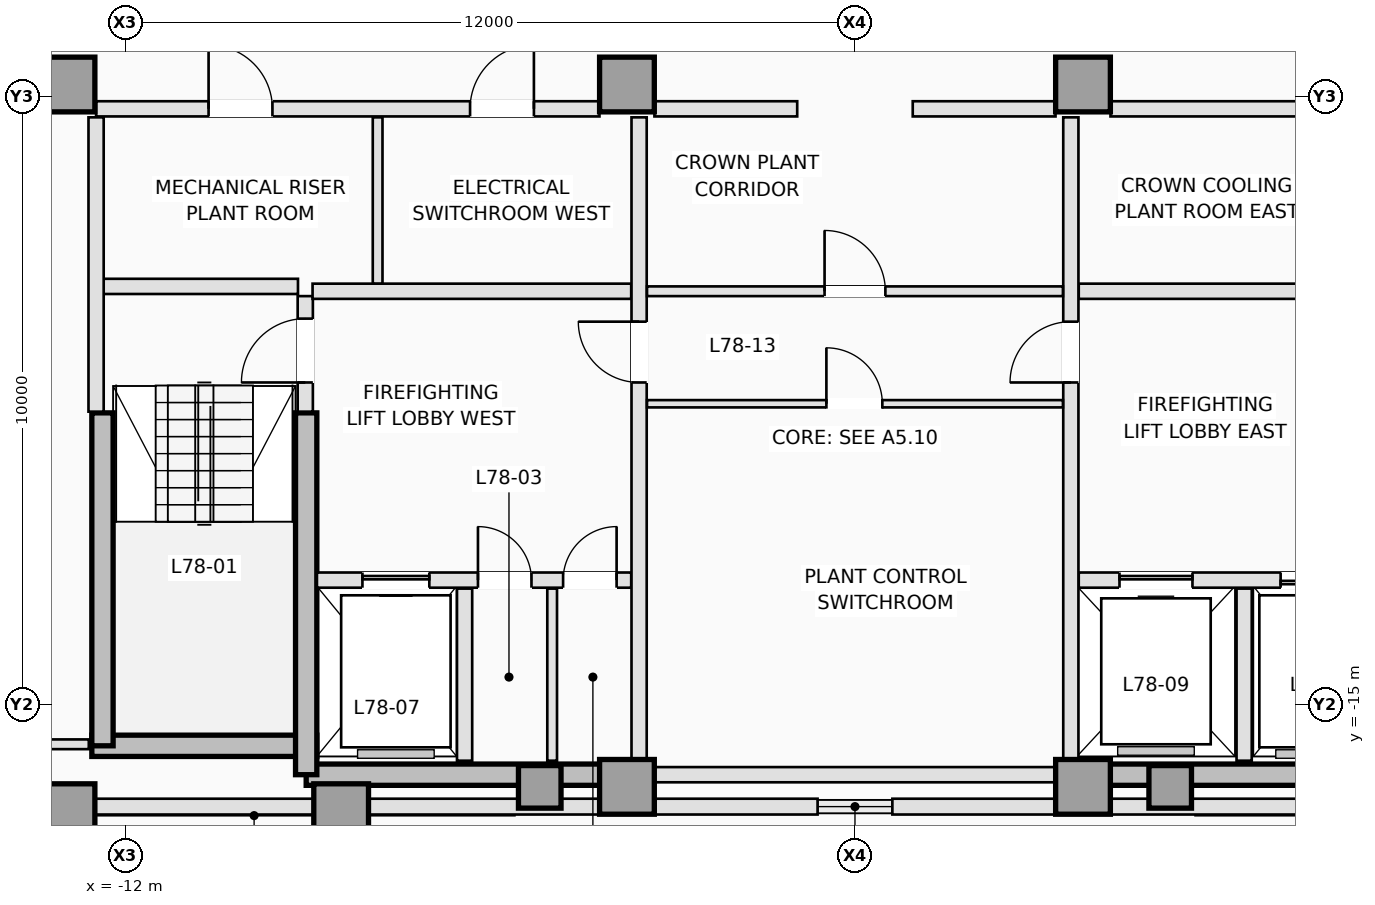
"""IFC4 building model, lengths in metres.
Left out: names, types, materials, properties, quantities, classifications, styles, units other than length and angle.
Written with IfcOpenShell. Run it as: python <this file> out.ifc"""

import sys

from ifc_helpers import new_model, si_unit, direction, frame, frame_2d, origin, origin_2d, place, context, subcontext, project, spatial, rectangle, extrude, element, fill, save


model = new_model("IFC4")
c1 = context("Model", 3, precision=1e-05, world=origin(), true_north=direction((0.0, 1.0)))
c2 = subcontext(c1, "Body", "Model", "MODEL_VIEW")
j1 = project(units=[si_unit("LENGTHUNIT", "METRE"), si_unit("PLANEANGLEUNIT", "RADIAN")], contexts=[c1])
p1 = place(None, origin())
s1 = spatial("IfcSite", under=j1, at=p1, CompositionType="ELEMENT")
p2 = place(p1, origin())
s2 = spatial("IfcBuilding", under=s1, at=p2, CompositionType="ELEMENT")
p3 = place(p2, frame((0.0, 0.0, 280.5)))
s3 = spatial("IfcBuildingStorey", under=s2, at=p3, CompositionType="ELEMENT", Elevation=280.5)
p4 = place(p3, frame((-12.55, -15.675, 0.0), z_axis=(0.0, 0.0, 1.0), x_axis=(1.0, 0.0, 0.0)))
e1 = element("IfcWall", 1, at=p4, inside=s3, PredefinedType="SHEAR", context=c2, shape_type="SweptSolid", body=[
    extrude(rectangle(XDim=3.7, YDim=0.35, at=frame_2d((1.85, 0.0))), origin(), (0.0, 0.0, 1.0), 3.2),
])
for number, where, z_axis, x_axis in (
    (2, (-9.025, -16.15, 0.0), (0.0, 0.0, 1.0), (1.0, 0.0, 0.0)),
    (3, (3.75, -16.15, 0.0), (0.0, 0.0, 1.0), (1.0, 0.0, 0.0)),
):
    element("IfcWall", number, at=place(p3, frame(where, z_axis=z_axis, x_axis=x_axis)), inside=s3, PredefinedType="SHEAR", context=c2, shape_type="SweptSolid", body=[
        extrude(rectangle(XDim=5.275, YDim=0.35, at=frame_2d((2.637, 0.0))), origin(), (0.0, 0.0, 1.0), 3.2),
    ])
p5 = place(p3, frame((-12.375, -15.675, 0.0), z_axis=(0.0, 0.0, 1.0), x_axis=(0.0, 1.0, 0.0)))
e4 = element("IfcWall", 4, at=p5, inside=s3, PredefinedType="SHEAR", context=c2, shape_type="SweptSolid", body=[
    extrude(rectangle(XDim=5.475, YDim=0.35, at=frame_2d((2.738, 0.0))), origin(), (0.0, 0.0, 1.0), 3.2),
])
p6 = place(p3, frame((-9.025, -16.15, 0.0), z_axis=(0.0, 0.0, 1.0), x_axis=(0.0, 1.0, 0.0)))
e5 = element("IfcWall", 5, at=p6, inside=s3, PredefinedType="SHEAR", context=c2, shape_type="SweptSolid", body=[
    extrude(rectangle(XDim=5.95, YDim=0.35, at=frame_2d((2.975, 0.0))), origin(), (0.0, 0.0, 1.0), 3.2),
])
for number, where, z_axis, x_axis in (
    (6, (-12.95, -16.75, 0.0), (0.0, 0.0, 1.0), (1.0, 0.0, 0.0)),
    (7, (-8.45, -16.75, 0.0), (0.0, 0.0, 1.0), (1.0, 0.0, 0.0)),
    (8, (-3.75, -16.35, 0.0), (0.0, 0.0, 1.0), (1.0, 0.0, 0.0)),
    (9, (3.75, -16.35, 0.0), (0.0, 0.0, 1.0), (1.0, 0.0, 0.0)),
    (10, (-12.95, -4.8, 0.0), (0.0, 0.0, 1.0), (1.0, 0.0, 0.0)),
    (11, (-3.75, -4.8, 0.0), (0.0, 0.0, 1.0), (1.0, 0.0, 0.0)),
    (12, (3.75, -4.8, 0.0), (0.0, 0.0, 1.0), (1.0, 0.0, 0.0)),
):
    element("IfcColumn", number, at=place(p3, frame(where, z_axis=z_axis, x_axis=x_axis)), inside=s3, PredefinedType="COLUMN", context=c2, shape_type="SweptSolid", body=[
        extrude(rectangle(XDim=0.9, YDim=0.9, at=origin_2d()), origin(), (0.0, 0.0, 1.0), 3.2),
    ])
for number, where, z_axis, x_axis in (
    (13, (-5.184, -16.35, 0.0), (0.0, 0.0, 1.0), (0.0, 1.0, 0.0)),
    (14, (5.184, -16.35, 0.0), (0.0, 0.0, 1.0), (0.0, 1.0, 0.0)),
):
    element("IfcColumn", number, at=place(p3, frame(where, z_axis=z_axis, x_axis=x_axis)), inside=s3, PredefinedType="COLUMN", context=c2, shape_type="SweptSolid", body=[
        extrude(rectangle(XDim=0.7, YDim=0.7, at=origin_2d()), origin(), (0.0, 0.0, 1.0), 3.2),
    ])
for number, where, z_axis, x_axis in (
    (15, (15.542, -16.675, 0.0), (0.0, 0.0, 1.0), (-1.0, 0.0, 0.0)),
    (16, (-4.22, -16.675, 0.0), (0.0, 0.0, 1.0), (-1.0, 0.0, 0.0)),
):
    element("IfcWall", number, at=place(p3, frame(where, z_axis=z_axis, x_axis=x_axis)), inside=s3, PredefinedType="STANDARD", context=c2, shape_type="SweptSolid", body=[
        extrude(rectangle(XDim=11.323, YDim=0.26, at=frame_2d((5.661, 0.0))), origin(), (0.0, 0.0, 1.0), 2.234),
    ])
for number, where, z_axis, x_axis in (
    (17, (3.28, -16.675, 0.0), (0.0, 0.0, 1.0), (-1.0, 0.0, 0.0)),
    (18, (-0.615, -16.675, 0.0), (0.0, 0.0, 1.0), (-1.0, 0.0, 0.0)),
):
    element("IfcWall", number, at=place(p3, frame(where, z_axis=z_axis, x_axis=x_axis)), inside=s3, PredefinedType="STANDARD", context=c2, shape_type="SweptSolid", body=[
        extrude(rectangle(XDim=2.665, YDim=0.26, at=frame_2d((1.333, 0.0))), origin(), (0.0, 0.0, 1.0), 2.95),
    ])
p7 = place(p3, frame((-18.292, -11.781, 0.0), z_axis=(0.0, 0.0, 1.0), x_axis=(0.490270316201, 0.871570431492, 0.0)))
e19 = element("IfcWall", 19, at=p7, inside=s3, PredefinedType="STANDARD", context=c2, shape_type="SweptSolid", body=[
    extrude(rectangle(XDim=10.216, YDim=0.26, at=frame_2d((5.108, 0.0))), origin(), (0.0, 0.0, 1.0), 2.95),
])
p8 = place(p3, frame((-9.04, -10.18, 0.0), z_axis=(0.0, 0.0, 1.0), x_axis=(0.0, 1.0, 0.0)))
e20 = element("IfcWall", 20, at=p8, inside=s3, PredefinedType="PARTITIONING", context=c2, shape_type="SweptSolid", body=[
    extrude(rectangle(XDim=1.9, YDim=0.25, at=frame_2d((0.95, 0.0))), origin(), (0.0, 0.0, 1.0), 2.95),
])
p9 = place(p8, frame((0.48, 0.0, 0.0)))
e21 = element("IfcOpeningElement", 21, at=p9, cuts=e20, PredefinedType="OPENING", context=c2, shape_type="SweptSolid", body=[
    extrude(rectangle(XDim=1.05, YDim=2.15, at=frame_2d((0.525, 1.075))), frame((0.0, 0.135, 0.0), z_axis=(0.0, -1.0, 0.0), x_axis=(1.0, 0.0, 0.0)), (0.0, 0.0, 1.0), 0.27),
])
p10 = place(p3, frame((-12.38, -8.12, 0.0), z_axis=(0.0, 0.0, 1.0), x_axis=(1.0, 0.0, 0.0)))
e22 = element("IfcWall", 22, at=p10, inside=s3, PredefinedType="PARTITIONING", context=c2, shape_type="SweptSolid", body=[
    extrude(rectangle(XDim=3.22, YDim=0.25, at=frame_2d((1.61, 0.0))), origin(), (0.0, 0.0, 1.0), 2.95),
])
p11 = place(p3, frame((-12.48, -10.18, 0.0), z_axis=(0.0, 0.0, 1.0), x_axis=(0.0, 1.0, 0.0)))
e23 = element("IfcWall", 23, at=p11, inside=s3, PredefinedType="PARTITIONING", context=c2, shape_type="SweptSolid", body=[
    extrude(rectangle(XDim=4.84, YDim=0.25, at=frame_2d((2.42, 0.0))), origin(), (0.0, 0.0, 1.0), 2.95),
])
p12 = place(p3, frame((-8.848, -12.95, 0.0), z_axis=(0.0, 0.0, 1.0), x_axis=(1.0, 0.0, 0.0)))
e24 = element("IfcWall", 24, at=p12, inside=s3, PredefinedType="PARTITIONING", context=c2, shape_type="SweptSolid", body=[
    extrude(rectangle(XDim=5.168, YDim=0.25, at=frame_2d((2.584, 0.0))), origin(), (0.0, 0.0, 1.0), 2.95),
])
p13 = place(p12, frame((0.748, 0.0, 0.0)))
e25 = element("IfcOpeningElement", 25, at=p13, cuts=e24, PredefinedType="OPENING", context=c2, shape_type="SweptSolid", body=[
    extrude(rectangle(XDim=1.1, YDim=2.15, at=frame_2d((0.55, 1.075))), frame((0.0, 0.135, 0.0), z_axis=(0.0, -1.0, 0.0), x_axis=(1.0, 0.0, 0.0)), (0.0, 0.0, 1.0), 0.27),
])
p14 = place(p12, frame((2.648, 0.0, 0.0)))
e26 = element("IfcOpeningElement", 26, at=p14, cuts=e24, PredefinedType="OPENING", context=c2, shape_type="SweptSolid", body=[
    extrude(rectangle(XDim=0.88, YDim=2.1, at=frame_2d((0.44, 1.05))), frame((0.0, 0.135, 0.0), z_axis=(0.0, -1.0, 0.0), x_axis=(1.0, 0.0, 0.0)), (0.0, 0.0, 1.0), 0.27),
])
p15 = place(p12, frame((4.048, 0.0, 0.0)))
e27 = element("IfcOpeningElement", 27, at=p15, cuts=e24, PredefinedType="OPENING", context=c2, shape_type="SweptSolid", body=[
    extrude(rectangle(XDim=0.88, YDim=2.1, at=frame_2d((0.44, 1.05))), frame((0.0, 0.135, 0.0), z_axis=(0.0, -1.0, 0.0), x_axis=(1.0, 0.0, 0.0)), (0.0, 0.0, 1.0), 0.27),
])
p16 = place(p3, frame((3.68, -12.95, 0.0), z_axis=(0.0, 0.0, 1.0), x_axis=(1.0, 0.0, 0.0)))
e28 = element("IfcWall", 28, at=p16, inside=s3, PredefinedType="PARTITIONING", context=c2, shape_type="SweptSolid", body=[
    extrude(rectangle(XDim=5.168, YDim=0.25, at=frame_2d((2.584, 0.0))), origin(), (0.0, 0.0, 1.0), 2.95),
])
p17 = place(p16, frame((3.32, 0.0, 0.0)))
e29 = element("IfcOpeningElement", 29, at=p17, cuts=e28, PredefinedType="OPENING", context=c2, shape_type="SweptSolid", body=[
    extrude(rectangle(XDim=1.1, YDim=2.15, at=frame_2d((0.55, 1.075))), frame((0.0, 0.135, 0.0), z_axis=(0.0, -1.0, 0.0), x_axis=(1.0, 0.0, 0.0)), (0.0, 0.0, 1.0), 0.27),
])
p18 = place(p16, frame((0.67, 0.0, 0.0)))
e30 = element("IfcOpeningElement", 30, at=p18, cuts=e28, PredefinedType="OPENING", context=c2, shape_type="SweptSolid", body=[
    extrude(rectangle(XDim=1.2, YDim=2.15, at=frame_2d((0.6, 1.075))), frame((0.0, 0.135, 0.0), z_axis=(0.0, -1.0, 0.0), x_axis=(1.0, 0.0, 0.0)), (0.0, 0.0, 1.0), 0.27),
])
p19 = place(p3, frame((-6.42, -15.92, 0.0), z_axis=(0.0, 0.0, 1.0), x_axis=(0.0, 1.0, 0.0)))
e31 = element("IfcWall", 31, at=p19, inside=s3, PredefinedType="PARTITIONING", context=c2, shape_type="SweptSolid", body=[
    extrude(rectangle(XDim=2.83, YDim=0.25, at=frame_2d((1.415, 0.0))), origin(), (0.0, 0.0, 1.0), 2.95),
])
p20 = place(p3, frame((-4.98, -15.92, 0.0), z_axis=(0.0, 0.0, 1.0), x_axis=(0.0, 1.0, 0.0)))
e32 = element("IfcWall", 32, at=p20, inside=s3, PredefinedType="PARTITIONING", context=c2, shape_type="SweptSolid", body=[
    extrude(rectangle(XDim=2.83, YDim=0.16, at=frame_2d((1.415, 0.0))), origin(), (0.0, 0.0, 1.0), 2.95),
])
p21 = place(p3, frame((6.4, -15.92, 0.0), z_axis=(0.0, 0.0, 1.0), x_axis=(0.0, 1.0, 0.0)))
e33 = element("IfcWall", 33, at=p21, inside=s3, PredefinedType="PARTITIONING", context=c2, shape_type="SweptSolid", body=[
    extrude(rectangle(XDim=2.83, YDim=0.25, at=frame_2d((1.415, 0.0))), origin(), (0.0, 0.0, 1.0), 2.95),
])
for number, where, z_axis, x_axis in (
    (34, (-8.92, -8.2, 0.0), (0.0, 0.0, 1.0), (1.0, 0.0, 0.0)),
    (35, (3.68, -8.2, 0.0), (0.0, 0.0, 1.0), (1.0, 0.0, 0.0)),
):
    element("IfcWall", number, at=place(p3, frame(where, z_axis=z_axis, x_axis=x_axis)), inside=s3, PredefinedType="PARTITIONING", context=c2, shape_type="SweptSolid", body=[
        extrude(rectangle(XDim=5.24, YDim=0.25, at=frame_2d((2.62, 0.0))), origin(), (0.0, 0.0, 1.0), 2.95),
    ])
p22 = place(p3, frame((-3.55, -15.898, 0.0), z_axis=(0.0, 0.0, 1.0), x_axis=(0.0, 1.0, 0.0)))
e36 = element("IfcWall", 36, at=p22, inside=s3, PredefinedType="PARTITIONING", context=c2, shape_type="SweptSolid", body=[
    extrude(rectangle(XDim=10.558, YDim=0.25, at=frame_2d((5.279, 0.0))), origin(), (0.0, 0.0, 1.0), 2.95),
])
p23 = place(p22, frame((6.198, 0.0, 0.0)))
e37 = element("IfcOpeningElement", 37, at=p23, cuts=e36, PredefinedType="OPENING", context=c2, shape_type="SweptSolid", body=[
    extrude(rectangle(XDim=1.0, YDim=2.15, at=frame_2d((0.5, 1.075))), frame((0.0, 0.135, 0.0), z_axis=(0.0, -1.0, 0.0), x_axis=(1.0, 0.0, 0.0)), (0.0, 0.0, 1.0), 0.27),
])
p24 = place(p3, frame((3.55, -15.898, 0.0), z_axis=(0.0, 0.0, 1.0), x_axis=(0.0, 1.0, 0.0)))
e38 = element("IfcWall", 38, at=p24, inside=s3, PredefinedType="PARTITIONING", context=c2, shape_type="SweptSolid", body=[
    extrude(rectangle(XDim=10.558, YDim=0.25, at=frame_2d((5.279, 0.0))), origin(), (0.0, 0.0, 1.0), 2.95),
])
p25 = place(p24, frame((6.198, 0.0, 0.0)))
e39 = element("IfcOpeningElement", 39, at=p25, cuts=e38, PredefinedType="OPENING", context=c2, shape_type="SweptSolid", body=[
    extrude(rectangle(XDim=1.0, YDim=2.15, at=frame_2d((0.5, 1.075))), frame((0.0, 0.135, 0.0), z_axis=(0.0, -1.0, 0.0), x_axis=(1.0, 0.0, 0.0)), (0.0, 0.0, 1.0), 0.27),
])
p26 = place(p3, frame((-12.48, -5.2, 0.0), z_axis=(0.0, 0.0, 1.0), x_axis=(1.0, 0.0, 0.0)))
e40 = element("IfcWall", 40, at=p26, inside=s3, PredefinedType="PARTITIONING", context=c2, shape_type="SweptSolid", body=[
    extrude(rectangle(XDim=8.278, YDim=0.25, at=frame_2d((4.139, 0.0))), origin(), (0.0, 0.0, 1.0), 2.95),
])
p27 = place(p26, frame((1.85, 0.0, 0.0)))
e41 = element("IfcOpeningElement", 41, at=p27, cuts=e40, PredefinedType="OPENING", context=c2, shape_type="SweptSolid", body=[
    extrude(rectangle(XDim=1.05, YDim=2.12, at=frame_2d((0.525, 1.06))), frame((0.0, 0.135, 0.0), z_axis=(0.0, -1.0, 0.0), x_axis=(1.0, 0.0, 0.0)), (0.0, 0.0, 1.0), 0.27),
])
p28 = place(p26, frame((6.15, 0.0, 0.0)))
e42 = element("IfcOpeningElement", 42, at=p28, cuts=e40, PredefinedType="OPENING", context=c2, shape_type="SweptSolid", body=[
    extrude(rectangle(XDim=1.05, YDim=2.12, at=frame_2d((0.525, 1.06))), frame((0.0, 0.135, 0.0), z_axis=(0.0, -1.0, 0.0), x_axis=(1.0, 0.0, 0.0)), (0.0, 0.0, 1.0), 0.27),
])
p29 = place(p3, frame((4.202, -5.2, 0.0), z_axis=(0.0, 0.0, 1.0), x_axis=(1.0, 0.0, 0.0)))
e43 = element("IfcWall", 43, at=p29, inside=s3, PredefinedType="PARTITIONING", context=c2, shape_type="SweptSolid", body=[
    extrude(rectangle(XDim=8.278, YDim=0.25, at=frame_2d((4.139, 0.0))), origin(), (0.0, 0.0, 1.0), 2.95),
])
p30 = place(p29, frame((3.148, 0.0, 0.0)))
e44 = element("IfcOpeningElement", 44, at=p30, cuts=e43, PredefinedType="OPENING", context=c2, shape_type="SweptSolid", body=[
    extrude(rectangle(XDim=1.05, YDim=2.12, at=frame_2d((0.525, 1.06))), frame((0.0, 0.135, 0.0), z_axis=(0.0, -1.0, 0.0), x_axis=(1.0, 0.0, 0.0)), (0.0, 0.0, 1.0), 0.27),
])
for number, where, z_axis, x_axis in (
    (45, (-3.298, -5.2, 0.0), (0.0, 0.0, 1.0), (1.0, 0.0, 0.0)),
    (46, (0.95, -5.2, 0.0), (0.0, 0.0, 1.0), (1.0, 0.0, 0.0)),
):
    element("IfcWall", number, at=place(p3, frame(where, z_axis=z_axis, x_axis=x_axis)), inside=s3, PredefinedType="PARTITIONING", context=c2, shape_type="SweptSolid", body=[
        extrude(rectangle(XDim=2.348, YDim=0.25, at=frame_2d((1.174, 0.0))), origin(), (0.0, 0.0, 1.0), 2.95),
    ])
p31 = place(p3, frame((-7.85, -8.073, 0.0), z_axis=(0.0, 0.0, 1.0), x_axis=(0.0, 1.0, 0.0)))
e47 = element("IfcWall", 47, at=p31, inside=s3, PredefinedType="PARTITIONING", context=c2, shape_type="SweptSolid", body=[
    extrude(rectangle(XDim=2.733, YDim=0.16, at=frame_2d((1.366, 0.0))), origin(), (0.0, 0.0, 1.0), 2.95),
])
p32 = place(p3, frame((-3.298, -16.15, 0.0), z_axis=(0.0, 0.0, 1.0), x_axis=(1.0, 0.0, 0.0)))
e48 = element("IfcWall", 48, at=p32, inside=s3, PredefinedType="PARTITIONING", context=c2, shape_type="SweptSolid", body=[
    extrude(rectangle(XDim=6.596, YDim=0.25, at=frame_2d((3.298, 0.0))), origin(), (0.0, 0.0, 1.0), 2.544),
])
p33 = place(p3, frame((-3.42, -8.2, 0.0), z_axis=(0.0, 0.0, 1.0), x_axis=(1.0, 0.0, 0.0)))
e49 = element("IfcWall", 49, at=p33, inside=s3, PredefinedType="PARTITIONING", context=c2, shape_type="SweptSolid", body=[
    extrude(rectangle(XDim=6.84, YDim=0.16, at=frame_2d((3.42, 0.0))), origin(), (0.0, 0.0, 1.0), 2.95),
])
p34 = place(p33, frame((2.92, 0.0, 0.0)))
e50 = element("IfcOpeningElement", 50, at=p34, cuts=e49, PredefinedType="OPENING", context=c2, shape_type="SweptSolid", body=[
    extrude(rectangle(XDim=1.0, YDim=2.15, at=frame_2d((0.5, 1.075))), frame((0.0, 0.09, 0.0), z_axis=(0.0, -1.0, 0.0), x_axis=(1.0, 0.0, 0.0)), (0.0, 0.0, 1.0), 0.18),
])
p35 = place(p3, frame((-3.42, -10.05, 0.0), z_axis=(0.0, 0.0, 1.0), x_axis=(1.0, 0.0, 0.0)))
e51 = element("IfcWall", 51, at=p35, inside=s3, PredefinedType="PARTITIONING", context=c2, shape_type="SweptSolid", body=[
    extrude(rectangle(XDim=6.84, YDim=0.12, at=frame_2d((3.42, 0.0))), origin(), (0.0, 0.0, 1.0), 2.95),
])
p36 = place(p35, frame((2.95, 0.0, 0.0)))
e52 = element("IfcOpeningElement", 52, at=p36, cuts=e51, PredefinedType="OPENING", context=c2, shape_type="SweptSolid", body=[
    extrude(rectangle(XDim=0.92, YDim=2.12, at=frame_2d((0.46, 1.06))), frame((0.0, 0.07, 0.0), z_axis=(0.0, -1.0, 0.0), x_axis=(1.0, 0.0, 0.0)), (0.0, 0.0, 1.0), 0.14),
])
p37 = place(p3, frame((-15.743, -15.65, 0.0), z_axis=(0.0, 0.0, 1.0), x_axis=(1.0, 0.0, 0.0)))
e53 = element("IfcWall", 53, at=p37, inside=s3, PredefinedType="PARTITIONING", context=c2, shape_type="SweptSolid", body=[
    extrude(rectangle(XDim=3.143, YDim=0.16, at=frame_2d((1.571, 0.0))), origin(), (0.0, 0.0, 1.0), 2.95),
])
p38 = place(p13, origin())
e54 = element("IfcDoor", 54, at=p38, inside=s3, OperationType="SLIDING_TO_LEFT", PredefinedType="DOOR", context=c2, shape_type="SweptSolid", body=[
    extrude(rectangle(XDim=1.1, YDim=2.15, at=frame_2d((0.55, 1.075))), frame((0.0, 0.025, 0.0), z_axis=(0.0, -1.0, 0.0), x_axis=(1.0, 0.0, 0.0)), (0.0, 0.0, 1.0), 0.05),
])
fill(e25, e54)
p39 = place(p17, origin())
e55 = element("IfcDoor", 55, at=p39, inside=s3, OperationType="SLIDING_TO_RIGHT", PredefinedType="DOOR", context=c2, shape_type="SweptSolid", body=[
    extrude(rectangle(XDim=1.1, YDim=2.15, at=frame_2d((0.55, 1.075))), frame((0.0, 0.025, 0.0), z_axis=(0.0, -1.0, 0.0), x_axis=(1.0, 0.0, 0.0)), (0.0, 0.0, 1.0), 0.05),
])
fill(e29, e55)
p40 = place(p18, origin())
e56 = element("IfcDoor", 56, at=p40, inside=s3, OperationType="SLIDING_TO_LEFT", PredefinedType="DOOR", context=c2, shape_type="SweptSolid", body=[
    extrude(rectangle(XDim=1.2, YDim=2.15, at=frame_2d((0.6, 1.075))), frame((0.0, 0.025, 0.0), z_axis=(0.0, -1.0, 0.0), x_axis=(1.0, 0.0, 0.0)), (0.0, 0.0, 1.0), 0.05),
])
fill(e30, e56)
p41 = place(p9, origin())
e57 = element("IfcDoor", 57, at=p41, inside=s3, OperationType="SINGLE_SWING_LEFT", PredefinedType="DOOR", context=c2, shape_type="SweptSolid", body=[
    extrude(rectangle(XDim=1.05, YDim=2.15, at=frame_2d((0.525, 1.075))), frame((0.0, 0.025, 0.0), z_axis=(0.0, -1.0, 0.0), x_axis=(1.0, 0.0, 0.0)), (0.0, 0.0, 1.0), 0.05),
])
fill(e21, e57)
p42 = place(p14, origin())
e58 = element("IfcDoor", 58, at=p42, inside=s3, OperationType="SINGLE_SWING_LEFT", PredefinedType="TRAPDOOR", context=c2, shape_type="SweptSolid", body=[
    extrude(rectangle(XDim=0.88, YDim=2.1, at=frame_2d((0.44, 1.05))), frame((0.0, 0.025, 0.0), z_axis=(0.0, -1.0, 0.0), x_axis=(1.0, 0.0, 0.0)), (0.0, 0.0, 1.0), 0.05),
])
fill(e26, e58)
p43 = place(p15, origin())
e59 = element("IfcDoor", 59, at=p43, inside=s3, OperationType="SINGLE_SWING_RIGHT", PredefinedType="TRAPDOOR", context=c2, shape_type="SweptSolid", body=[
    extrude(rectangle(XDim=0.88, YDim=2.1, at=frame_2d((0.44, 1.05))), frame((0.0, 0.025, 0.0), z_axis=(0.0, -1.0, 0.0), x_axis=(1.0, 0.0, 0.0)), (0.0, 0.0, 1.0), 0.05),
])
fill(e27, e59)
p44 = place(p23, origin())
e60 = element("IfcDoor", 60, at=p44, inside=s3, OperationType="SINGLE_SWING_RIGHT", PredefinedType="DOOR", context=c2, shape_type="SweptSolid", body=[
    extrude(rectangle(XDim=1.0, YDim=2.15, at=frame_2d((0.5, 1.075))), frame((0.0, 0.025, 0.0), z_axis=(0.0, -1.0, 0.0), x_axis=(1.0, 0.0, 0.0)), (0.0, 0.0, 1.0), 0.05),
])
fill(e37, e60)
p45 = place(p25, origin())
e61 = element("IfcDoor", 61, at=p45, inside=s3, OperationType="SINGLE_SWING_LEFT", PredefinedType="DOOR", context=c2, shape_type="SweptSolid", body=[
    extrude(rectangle(XDim=1.0, YDim=2.15, at=frame_2d((0.5, 1.075))), frame((0.0, 0.025, 0.0), z_axis=(0.0, -1.0, 0.0), x_axis=(1.0, 0.0, 0.0)), (0.0, 0.0, 1.0), 0.05),
])
fill(e39, e61)
p46 = place(p27, origin())
e62 = element("IfcDoor", 62, at=p46, inside=s3, OperationType="SINGLE_SWING_LEFT", PredefinedType="DOOR", context=c2, shape_type="SweptSolid", body=[
    extrude(rectangle(XDim=1.05, YDim=2.12, at=frame_2d((0.525, 1.06))), frame((0.0, 0.025, 0.0), z_axis=(0.0, -1.0, 0.0), x_axis=(1.0, 0.0, 0.0)), (0.0, 0.0, 1.0), 0.05),
])
fill(e41, e62)
p47 = place(p28, origin())
e63 = element("IfcDoor", 63, at=p47, inside=s3, OperationType="SINGLE_SWING_RIGHT", PredefinedType="DOOR", context=c2, shape_type="SweptSolid", body=[
    extrude(rectangle(XDim=1.05, YDim=2.12, at=frame_2d((0.525, 1.06))), frame((0.0, 0.025, 0.0), z_axis=(0.0, -1.0, 0.0), x_axis=(1.0, 0.0, 0.0)), (0.0, 0.0, 1.0), 0.05),
])
fill(e42, e63)
p48 = place(p34, origin())
e64 = element("IfcDoor", 64, at=p48, inside=s3, OperationType="SINGLE_SWING_LEFT", PredefinedType="DOOR", context=c2, shape_type="SweptSolid", body=[
    extrude(rectangle(XDim=1.0, YDim=2.15, at=frame_2d((0.5, 1.075))), frame((0.0, 0.025, 0.0), z_axis=(0.0, -1.0, 0.0), x_axis=(1.0, 0.0, 0.0)), (0.0, 0.0, 1.0), 0.05),
])
fill(e50, e64)
p49 = place(p36, origin())
e65 = element("IfcDoor", 65, at=p49, inside=s3, OperationType="SINGLE_SWING_LEFT", PredefinedType="DOOR", context=c2, shape_type="SweptSolid", body=[
    extrude(rectangle(XDim=0.92, YDim=2.12, at=frame_2d((0.46, 1.06))), frame((0.0, 0.025, 0.0), z_axis=(0.0, -1.0, 0.0), x_axis=(1.0, 0.0, 0.0)), (0.0, 0.0, 1.0), 0.05),
])
fill(e52, e65)
save(model, sys.argv[1])
